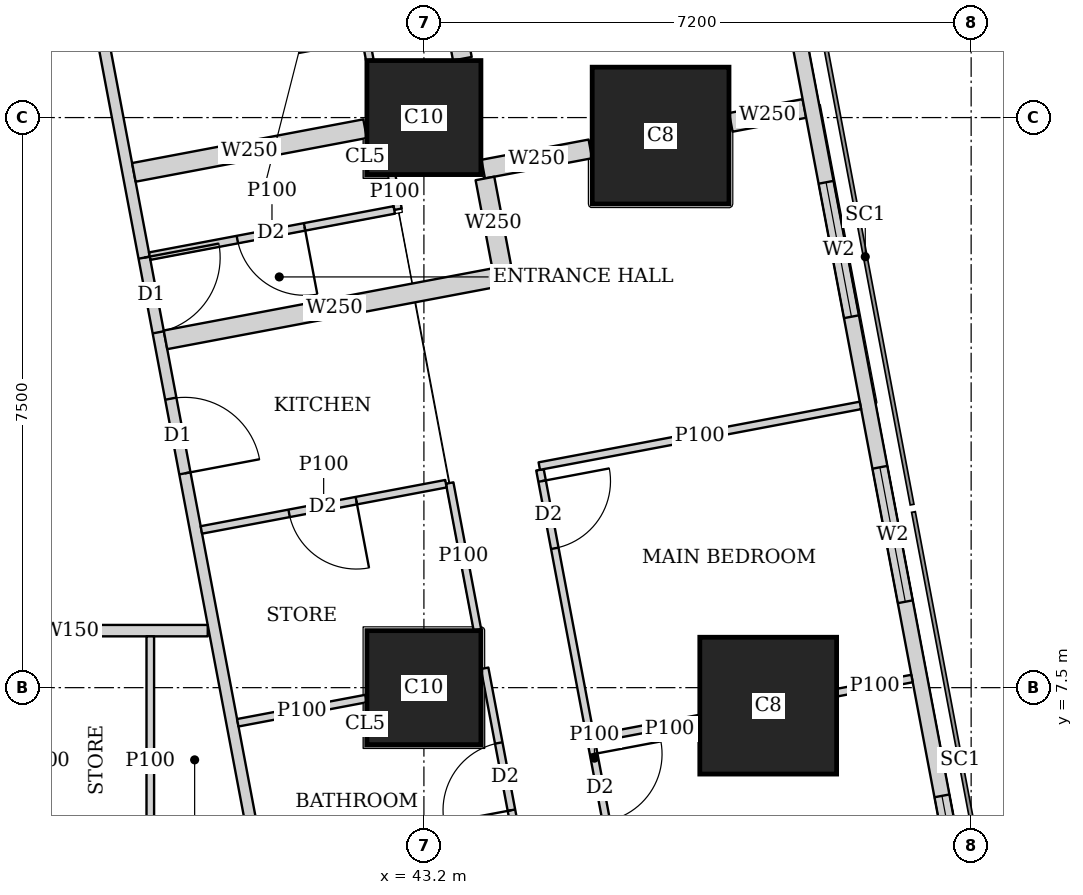
"""IFC4 building model, lengths in metres.
Left out: names, types, materials, properties, quantities, classifications, styles, units other than length and angle.
Written with IfcOpenShell. Run it as: python <this file> out.ifc"""

import sys

from ifc_helpers import new_model, si_unit, direction, frame, frame_2d, origin, origin_2d, place, context, subcontext, project, spatial, rectangle, extrude, element, fill, save


model = new_model("IFC4")
c1 = context("Model", 3, precision=1e-05, world=origin(), true_north=direction((0.0, 1.0)))
c2 = subcontext(c1, "Body", "Model", "MODEL_VIEW")
j1 = project(units=[si_unit("LENGTHUNIT", "METRE"), si_unit("PLANEANGLEUNIT", "RADIAN")], contexts=[c1])
p1 = place(None, origin())
s1 = spatial("IfcSite", under=j1, at=p1, CompositionType="ELEMENT")
p2 = place(p1, origin())
s2 = spatial("IfcBuilding", under=s1, at=p2, CompositionType="ELEMENT")
p3 = place(p2, frame((0.0, 0.0, 169.55)))
s3 = spatial("IfcBuildingStorey", under=s2, at=p3, CompositionType="ELEMENT", Elevation=169.55)
p4 = place(p3, frame((43.2, 7.5, 0.0), z_axis=(0.0, 0.0, 1.0), x_axis=(1.0, 0.0, 0.0)))
e1 = element("IfcColumn", 1, at=p4, inside=s3, PredefinedType="COLUMN", context=c2, shape_type="SweptSolid", body=[
    extrude(rectangle(XDim=1.5, YDim=1.5, at=origin_2d()), origin(), (0.0, 0.0, 1.0), 3.75),
])
p5 = place(p3, frame((47.73, 7.263, 0.0), z_axis=(0.0, 0.0, 1.0), x_axis=(1.0, 0.0, 0.0)))
e2 = element("IfcColumn", 2, at=p5, inside=s3, PredefinedType="COLUMN", context=c2, shape_type="SweptSolid", body=[
    extrude(rectangle(XDim=1.8, YDim=1.8, at=origin_2d()), origin(), (0.0, 0.0, 1.0), 3.75),
])
p6 = place(p3, frame((43.2, 15.0, 0.0), z_axis=(0.0, 0.0, 1.0), x_axis=(1.0, 0.0, 0.0)))
e3 = element("IfcColumn", 3, at=p6, inside=s3, PredefinedType="COLUMN", context=c2, shape_type="SweptSolid", body=[
    extrude(rectangle(XDim=1.5, YDim=1.5, at=origin_2d()), origin(), (0.0, 0.0, 1.0), 3.75),
])
p7 = place(p3, frame((46.314, 14.763, 0.0), z_axis=(0.0, 0.0, 1.0), x_axis=(1.0, 0.0, 0.0)))
e4 = element("IfcColumn", 4, at=p7, inside=s3, PredefinedType="COLUMN", context=c2, shape_type="SweptSolid", body=[
    extrude(rectangle(XDim=1.8, YDim=1.8, at=origin_2d()), origin(), (0.0, 0.0, 1.0), 3.75),
])
p8 = place(p3, frame((50.653, 2.703, 0.0), z_axis=(0.0, 0.0, 1.0), x_axis=(-0.185612026696, 0.982623109613, 0.0)))
e5 = element("IfcWall", 5, at=p8, inside=s3, PredefinedType="SOLIDWALL", context=c2, shape_type="SweptSolid", body=[
    extrude(rectangle(XDim=41.393, YDim=0.2, at=frame_2d((20.697, 0.0))), origin(), (0.0, 0.0, 1.0), 3.5),
])
p9 = place(p8, frame((1.633, 0.0, 0.9)))
e6 = element("IfcOpeningElement", 6, at=p9, cuts=e5, PredefinedType="OPENING", context=c2, shape_type="SweptSolid", body=[
    extrude(rectangle(XDim=1.8, YDim=1.5, at=frame_2d((0.9, 0.75))), frame((0.0, 0.11, 0.0), z_axis=(0.0, -1.0, 0.0), x_axis=(1.0, 0.0, 0.0)), (0.0, 0.0, 1.0), 0.22),
])
p10 = place(p8, frame((6.032, 0.0, 0.9)))
e7 = element("IfcOpeningElement", 7, at=p10, cuts=e5, PredefinedType="OPENING", context=c2, shape_type="SweptSolid", body=[
    extrude(rectangle(XDim=1.8, YDim=1.5, at=frame_2d((0.9, 0.75))), frame((0.0, 0.11, 0.0), z_axis=(0.0, -1.0, 0.0), x_axis=(1.0, 0.0, 0.0)), (0.0, 0.0, 1.0), 0.22),
])
p11 = place(p8, frame((9.848, 0.0, 0.9)))
e8 = element("IfcOpeningElement", 8, at=p11, cuts=e5, PredefinedType="OPENING", context=c2, shape_type="SweptSolid", body=[
    extrude(rectangle(XDim=1.8, YDim=1.5, at=frame_2d((0.9, 0.75))), frame((0.0, 0.11, 0.0), z_axis=(0.0, -1.0, 0.0), x_axis=(1.0, 0.0, 0.0)), (0.0, 0.0, 1.0), 0.22),
])
p12 = place(p8, frame((13.664, 0.0, 0.9)))
e9 = element("IfcOpeningElement", 9, at=p12, cuts=e5, PredefinedType="OPENING", context=c2, shape_type="SweptSolid", body=[
    extrude(rectangle(XDim=1.8, YDim=1.5, at=frame_2d((0.9, 0.75))), frame((0.0, 0.11, 0.0), z_axis=(0.0, -1.0, 0.0), x_axis=(1.0, 0.0, 0.0)), (0.0, 0.0, 1.0), 0.22),
])
p13 = place(p8, frame((17.481, 0.0, 0.9)))
e10 = element("IfcOpeningElement", 10, at=p13, cuts=e5, PredefinedType="OPENING", context=c2, shape_type="SweptSolid", body=[
    extrude(rectangle(XDim=1.8, YDim=1.5, at=frame_2d((0.9, 0.75))), frame((0.0, 0.11, 0.0), z_axis=(0.0, -1.0, 0.0), x_axis=(1.0, 0.0, 0.0)), (0.0, 0.0, 1.0), 0.22),
])
p14 = place(p8, frame((21.297, 0.0, 0.9)))
e11 = element("IfcOpeningElement", 11, at=p14, cuts=e5, PredefinedType="OPENING", context=c2, shape_type="SweptSolid", body=[
    extrude(rectangle(XDim=1.8, YDim=1.5, at=frame_2d((0.9, 0.75))), frame((0.0, 0.11, 0.0), z_axis=(0.0, -1.0, 0.0), x_axis=(1.0, 0.0, 0.0)), (0.0, 0.0, 1.0), 0.22),
])
p15 = place(p8, frame((25.113, 0.0, 0.9)))
e12 = element("IfcOpeningElement", 12, at=p15, cuts=e5, PredefinedType="OPENING", context=c2, shape_type="SweptSolid", body=[
    extrude(rectangle(XDim=1.8, YDim=1.5, at=frame_2d((0.9, 0.75))), frame((0.0, 0.11, 0.0), z_axis=(0.0, -1.0, 0.0), x_axis=(1.0, 0.0, 0.0)), (0.0, 0.0, 1.0), 0.22),
])
p16 = place(p8, frame((28.93, 0.0, 0.9)))
e13 = element("IfcOpeningElement", 13, at=p16, cuts=e5, PredefinedType="OPENING", context=c2, shape_type="SweptSolid", body=[
    extrude(rectangle(XDim=1.8, YDim=1.5, at=frame_2d((0.9, 0.75))), frame((0.0, 0.11, 0.0), z_axis=(0.0, -1.0, 0.0), x_axis=(1.0, 0.0, 0.0)), (0.0, 0.0, 1.0), 0.22),
])
p17 = place(p8, frame((32.746, 0.0, 0.9)))
e14 = element("IfcOpeningElement", 14, at=p17, cuts=e5, PredefinedType="OPENING", context=c2, shape_type="SweptSolid", body=[
    extrude(rectangle(XDim=1.8, YDim=1.5, at=frame_2d((0.9, 0.75))), frame((0.0, 0.11, 0.0), z_axis=(0.0, -1.0, 0.0), x_axis=(1.0, 0.0, 0.0)), (0.0, 0.0, 1.0), 0.22),
])
p18 = place(p8, frame((36.481, 0.0, 0.9)))
e15 = element("IfcOpeningElement", 15, at=p18, cuts=e5, PredefinedType="OPENING", context=c2, shape_type="SweptSolid", body=[
    extrude(rectangle(XDim=1.8, YDim=1.5, at=frame_2d((0.9, 0.75))), frame((0.0, 0.11, 0.0), z_axis=(0.0, -1.0, 0.0), x_axis=(1.0, 0.0, 0.0)), (0.0, 0.0, 1.0), 0.22),
])
p19 = place(p3, frame((40.356, 8.25, 0.0), z_axis=(0.0, 0.0, 1.0), x_axis=(-1.0, 0.0, 0.0)))
e16 = element("IfcWall", 16, at=p19, inside=s3, PredefinedType="SOLIDWALL", context=c2, shape_type="SweptSolid", body=[
    extrude(rectangle(XDim=3.605, YDim=0.15, at=frame_2d((1.802, 0.0))), origin(), (0.0, 0.0, 1.0), 3.5),
])
p20 = place(p3, frame((33.877, 43.029, 0.0), z_axis=(0.0, 0.0, 1.0), x_axis=(0.185596841028, -0.98262597798, 0.0)))
e17 = element("IfcWall", 17, at=p20, inside=s3, PredefinedType="SOLIDWALL", context=c2, shape_type="SweptSolid", body=[
    extrude(rectangle(XDim=41.66, YDim=0.15, at=frame_2d((20.83, 0.0))), origin(), (0.0, 0.0, 1.0), 2.5),
])
p21 = place(p20, frame((8.63, 0.0, 0.0)))
e18 = element("IfcOpeningElement", 18, at=p21, cuts=e17, PredefinedType="OPENING", context=c2, shape_type="SweptSolid", body=[
    extrude(rectangle(XDim=1.0, YDim=2.1, at=frame_2d((0.5, 1.05))), frame((0.0, 0.085, 0.0), z_axis=(0.0, -1.0, 0.0), x_axis=(1.0, 0.0, 0.0)), (0.0, 0.0, 1.0), 0.17),
])
p22 = place(p20, frame((13.841, 0.0, 0.0)))
e19 = element("IfcOpeningElement", 19, at=p22, cuts=e17, PredefinedType="OPENING", context=c2, shape_type="SweptSolid", body=[
    extrude(rectangle(XDim=1.0, YDim=2.1, at=frame_2d((0.5, 1.05))), frame((0.0, 0.085, 0.0), z_axis=(0.0, -1.0, 0.0), x_axis=(1.0, 0.0, 0.0)), (0.0, 0.0, 1.0), 0.17),
])
p23 = place(p20, frame((21.474, 0.0, 0.0)))
e20 = element("IfcOpeningElement", 20, at=p23, cuts=e17, PredefinedType="OPENING", context=c2, shape_type="SweptSolid", body=[
    extrude(rectangle(XDim=1.0, YDim=2.1, at=frame_2d((0.5, 1.05))), frame((0.0, 0.085, 0.0), z_axis=(0.0, -1.0, 0.0), x_axis=(1.0, 0.0, 0.0)), (0.0, 0.0, 1.0), 0.17),
])
p24 = place(p20, frame((30.4, 0.0, 0.0)))
e21 = element("IfcOpeningElement", 21, at=p24, cuts=e17, PredefinedType="OPENING", context=c2, shape_type="SweptSolid", body=[
    extrude(rectangle(XDim=1.0, YDim=2.1, at=frame_2d((0.5, 1.05))), frame((0.0, 0.085, 0.0), z_axis=(0.0, -1.0, 0.0), x_axis=(1.0, 0.0, 0.0)), (0.0, 0.0, 1.0), 0.17),
])
p25 = place(p20, frame((32.288, 0.0, 0.0)))
e22 = element("IfcOpeningElement", 22, at=p25, cuts=e17, PredefinedType="OPENING", context=c2, shape_type="SweptSolid", body=[
    extrude(rectangle(XDim=1.0, YDim=2.1, at=frame_2d((0.5, 1.05))), frame((0.0, 0.085, 0.0), z_axis=(0.0, -1.0, 0.0), x_axis=(1.0, 0.0, 0.0)), (0.0, 0.0, 1.0), 0.17),
])
p26 = place(p3, frame((39.6, 4.9, 0.0), z_axis=(0.0, 0.0, 1.0), x_axis=(0.0, 1.0, 0.0)))
e23 = element("IfcWall", 23, at=p26, inside=s3, PredefinedType="PARTITIONING", context=c2, shape_type="SweptSolid", body=[
    extrude(rectangle(XDim=3.275, YDim=0.1, at=frame_2d((1.638, 0.0))), origin(), (0.0, 0.0, 1.0), 3.5),
])
p27 = place(p3, frame((41.65, 20.193, 0.0), z_axis=(0.0, 0.0, 1.0), x_axis=(0.185692658583, -0.982607875273, 0.0)))
e24 = element("IfcWall", 24, at=p27, inside=s3, PredefinedType="PARTITIONING", context=c2, shape_type="SweptSolid", body=[
    extrude(rectangle(XDim=4.514, YDim=0.1, at=frame_2d((2.257, 0.0))), origin(), (0.0, 0.0, 1.0), 3.5),
])
p28 = place(p27, frame((0.655, 0.0, 0.0)))
e25 = element("IfcOpeningElement", 25, at=p28, cuts=e24, PredefinedType="OPENING", context=c2, shape_type="SweptSolid", body=[
    extrude(rectangle(XDim=0.9, YDim=2.1, at=frame_2d((0.45, 1.05))), frame((0.0, 0.06, 0.0), z_axis=(0.0, -1.0, 0.0), x_axis=(1.0, 0.0, 0.0)), (0.0, 0.0, 1.0), 0.12),
])
p29 = place(p27, frame((3.35, 0.0, 0.0)))
e26 = element("IfcOpeningElement", 26, at=p29, cuts=e24, PredefinedType="OPENING", context=c2, shape_type="SweptSolid", body=[
    extrude(rectangle(XDim=0.9, YDim=2.1, at=frame_2d((0.45, 1.05))), frame((0.0, 0.06, 0.0), z_axis=(0.0, -1.0, 0.0), x_axis=(1.0, 0.0, 0.0)), (0.0, 0.0, 1.0), 0.12),
])
p30 = place(p3, frame((42.775, 14.24, 0.0), z_axis=(0.0, 0.0, 1.0), x_axis=(0.185035443692, -0.982731847748, 0.0)))
e27 = element("IfcWall", 27, at=p30, inside=s3, PredefinedType="PARTITIONING", context=c2, shape_type="SweptSolid", body=[
    extrude(rectangle(XDim=0.454, YDim=0.1, at=frame_2d((0.227, 0.0))), origin(), (0.0, 0.0, 1.0), 3.5),
])
p31 = place(p3, frame((42.81, 13.785, 0.0), z_axis=(0.0, 0.0, 1.0), x_axis=(-0.982620626894, -0.185625169636, 0.0)))
e28 = element("IfcWall", 28, at=p31, inside=s3, PredefinedType="PARTITIONING", context=c2, shape_type="SweptSolid", body=[
    extrude(rectangle(XDim=3.275, YDim=0.1, at=frame_2d((1.637, 0.0))), origin(), (0.0, 0.0, 1.0), 3.5),
])
p32 = place(p31, frame((1.201, 0.0, 0.0)))
e29 = element("IfcOpeningElement", 29, at=p32, cuts=e28, PredefinedType="OPENING", context=c2, shape_type="SweptSolid", body=[
    extrude(rectangle(XDim=0.9, YDim=2.1, at=frame_2d((0.45, 1.05))), frame((0.0, 0.06, 0.0), z_axis=(0.0, -1.0, 0.0), x_axis=(1.0, 0.0, 0.0)), (0.0, 0.0, 1.0), 0.12),
])
p33 = place(p3, frame((42.426, 14.854, 0.0), z_axis=(0.0, 0.0, 1.0), x_axis=(-0.982603320446, -0.185716759201, 0.0)))
e30 = element("IfcWall", 30, at=p33, inside=s3, PredefinedType="SOLIDWALL", context=c2, shape_type="SweptSolid", body=[
    extrude(rectangle(XDim=3.096, YDim=0.25, at=frame_2d((1.548, 0.0))), origin(), (0.0, 0.0, 1.0), 3.5),
])
p34 = place(p3, frame((43.325, 17.792, 0.0), z_axis=(0.0, 0.0, 1.0), x_axis=(0.185565963553, -0.982631809566, 0.0)))
e31 = element("IfcWall", 31, at=p34, inside=s3, PredefinedType="SOLIDWALL", context=c2, shape_type="SweptSolid", body=[
    extrude(rectangle(XDim=2.054, YDim=0.25, at=frame_2d((1.027, 0.0))), origin(), (0.0, 0.0, 1.0), 3.5),
])
p35 = place(p3, frame((44.727, 10.366, 0.0), z_axis=(0.0, 0.0, 1.0), x_axis=(0.185578957652, -0.982629355595, 0.0)))
e32 = element("IfcWall", 32, at=p35, inside=s3, PredefinedType="PARTITIONING", context=c2, shape_type="SweptSolid", body=[
    extrude(rectangle(XDim=7.721, YDim=0.1, at=frame_2d((3.86, 0.0))), origin(), (0.0, 0.0, 1.0), 3.5),
])
p36 = place(p35, frame((0.151, 0.0, 0.0)))
e33 = element("IfcOpeningElement", 33, at=p36, cuts=e32, PredefinedType="OPENING", context=c2, shape_type="SweptSolid", body=[
    extrude(rectangle(XDim=0.9, YDim=2.1, at=frame_2d((0.45, 1.05))), frame((0.0, 0.06, 0.0), z_axis=(0.0, -1.0, 0.0), x_axis=(1.0, 0.0, 0.0)), (0.0, 0.0, 1.0), 0.12),
])
p37 = place(p35, frame((3.806, 0.0, 0.0)))
e34 = element("IfcOpeningElement", 34, at=p37, cuts=e32, PredefinedType="OPENING", context=c2, shape_type="SweptSolid", body=[
    extrude(rectangle(XDim=0.9, YDim=2.1, at=frame_2d((0.45, 1.05))), frame((0.0, 0.06, 0.0), z_axis=(0.0, -1.0, 0.0), x_axis=(1.0, 0.0, 0.0)), (0.0, 0.0, 1.0), 0.12),
])
p38 = place(p3, frame((43.539, 10.192, 0.0), z_axis=(0.0, 0.0, 1.0), x_axis=(0.18564540894, -0.982616803306, 0.0)))
e35 = element("IfcWall", 35, at=p38, inside=s3, PredefinedType="PARTITIONING", context=c2, shape_type="SweptSolid", body=[
    extrude(rectangle(XDim=1.966, YDim=0.1, at=frame_2d((0.983, 0.0))), origin(), (0.0, 0.0, 1.0), 3.5),
])
p39 = place(p3, frame((43.999, 7.755, 0.0), z_axis=(0.0, 0.0, 1.0), x_axis=(0.185565904578, -0.982631820703, 0.0)))
e36 = element("IfcWall", 36, at=p39, inside=s3, PredefinedType="PARTITIONING", context=c2, shape_type="SweptSolid", body=[
    extrude(rectangle(XDim=5.319, YDim=0.1, at=frame_2d((2.66, 0.0))), origin(), (0.0, 0.0, 1.0), 3.5),
])
p40 = place(p39, frame((1.0, 0.0, 0.0)))
e37 = element("IfcOpeningElement", 37, at=p40, cuts=e36, PredefinedType="OPENING", context=c2, shape_type="SweptSolid", body=[
    extrude(rectangle(XDim=0.9, YDim=2.1, at=frame_2d((0.45, 1.05))), frame((0.0, 0.06, 0.0), z_axis=(0.0, -1.0, 0.0), x_axis=(1.0, 0.0, 0.0)), (0.0, 0.0, 1.0), 0.12),
])
p41 = place(p39, frame((4.269, 0.0, 0.0)))
e38 = element("IfcOpeningElement", 38, at=p41, cuts=e36, PredefinedType="OPENING", context=c2, shape_type="SweptSolid", body=[
    extrude(rectangle(XDim=0.9, YDim=2.1, at=frame_2d((0.45, 1.05))), frame((0.0, 0.06, 0.0), z_axis=(0.0, -1.0, 0.0), x_axis=(1.0, 0.0, 0.0)), (0.0, 0.0, 1.0), 0.12),
])
p42 = place(p39, frame((2.665, 0.0, 0.0)))
e39 = element("IfcOpeningElement", 39, at=p42, cuts=e36, PredefinedType="OPENING", context=c2, shape_type="SweptSolid", body=[
    extrude(rectangle(XDim=0.9, YDim=2.1, at=frame_2d((0.45, 1.05))), frame((0.0, 0.06, 0.0), z_axis=(0.0, -1.0, 0.0), x_axis=(1.0, 0.0, 0.0)), (0.0, 0.0, 1.0), 0.12),
])
p43 = place(p3, frame((48.943, 11.213, 0.0), z_axis=(0.0, 0.0, 1.0), x_axis=(-0.982633535512, -0.185556823879, 0.0)))
e40 = element("IfcWall", 40, at=p43, inside=s3, PredefinedType="PARTITIONING", context=c2, shape_type="SweptSolid", body=[
    extrude(rectangle(XDim=4.3, YDim=0.1, at=frame_2d((2.15, 0.0))), origin(), (0.0, 0.0, 1.0), 2.1),
])
p44 = place(p3, frame((49.622, 7.62, 0.0), z_axis=(0.0, 0.0, 1.0), x_axis=(-0.982708646087, -0.185158626332, 0.0)))
e41 = element("IfcWall", 41, at=p44, inside=s3, PredefinedType="PARTITIONING", context=c2, shape_type="SweptSolid", body=[
    extrude(rectangle(XDim=1.0, YDim=0.1, at=frame_2d((0.5, 0.0))), origin(), (0.0, 0.0, 1.0), 3.5),
])
p45 = place(p3, frame((46.82, 7.091, 0.0), z_axis=(0.0, 0.0, 1.0), x_axis=(-0.982689853246, -0.185258339427, 0.0)))
e42 = element("IfcWall", 42, at=p45, inside=s3, PredefinedType="PARTITIONING", context=c2, shape_type="SweptSolid", body=[
    extrude(rectangle(XDim=1.398, YDim=0.1, at=frame_2d((0.699, 0.0))), origin(), (0.0, 0.0, 1.0), 3.5),
])
p46 = place(p3, frame((43.49, 10.183, 0.0), z_axis=(0.0, 0.0, 1.0), x_axis=(-0.982607026909, -0.185697147715, 0.0)))
e43 = element("IfcWall", 43, at=p46, inside=s3, PredefinedType="PARTITIONING", context=c2, shape_type="SweptSolid", body=[
    extrude(rectangle(XDim=3.275, YDim=0.1, at=frame_2d((1.637, 0.0))), origin(), (0.0, 0.0, 1.0), 3.5),
])
p47 = place(p46, frame((1.2, 0.0, 0.0)))
e44 = element("IfcOpeningElement", 44, at=p47, cuts=e43, PredefinedType="OPENING", context=c2, shape_type="SweptSolid", body=[
    extrude(rectangle(XDim=0.9, YDim=2.1, at=frame_2d((0.45, 1.05))), frame((0.0, 0.06, 0.0), z_axis=(0.0, -1.0, 0.0), x_axis=(1.0, 0.0, 0.0)), (0.0, 0.0, 1.0), 0.12),
])
p48 = place(p3, frame((42.44, 7.357, 0.0), z_axis=(0.0, 0.0, 1.0), x_axis=(-0.982643094077, -0.185506198448, 0.0)))
e45 = element("IfcWall", 45, at=p48, inside=s3, PredefinedType="PARTITIONING", context=c2, shape_type="SweptSolid", body=[
    extrude(rectangle(XDim=1.719, YDim=0.1, at=frame_2d((0.859, 0.0))), origin(), (0.0, 0.0, 1.0), 3.5),
])
p49 = place(p3, frame((48.206, 15.12, 0.0), z_axis=(0.0, 0.0, 1.0), x_axis=(-0.982576361834, -0.185859337043, 0.0)))
e46 = element("IfcWall", 46, at=p49, inside=s3, PredefinedType="SOLIDWALL", context=c2, shape_type="SweptSolid", body=[
    extrude(rectangle(XDim=0.985, YDim=0.25, at=frame_2d((0.493, 0.0))), origin(), (0.0, 0.0, 1.0), 2.1),
])
p50 = place(p3, frame((45.39, 14.588, 0.0), z_axis=(0.0, 0.0, 1.0), x_axis=(-0.982680951688, -0.18530555089, 0.0)))
e47 = element("IfcWall", 47, at=p50, inside=s3, PredefinedType="SOLIDWALL", context=c2, shape_type="SweptSolid", body=[
    extrude(rectangle(XDim=1.435, YDim=0.25, at=frame_2d((0.717, 0.0))), origin(), (0.0, 0.0, 1.0), 2.1),
])
p51 = place(p3, frame((44.246, 12.916, 0.0), z_axis=(0.0, 0.0, 1.0), x_axis=(-0.982612837616, -0.185666398014, 0.0)))
e48 = element("IfcWall", 48, at=p51, inside=s3, PredefinedType="SOLIDWALL", context=c2, shape_type="SweptSolid", body=[
    extrude(rectangle(XDim=4.525, YDim=0.25, at=frame_2d((2.262, 0.0))), origin(), (0.0, 0.0, 1.0), 3.5),
])
p52 = place(p3, frame((44.003, 14.199, 0.0), z_axis=(0.0, 0.0, 1.0), x_axis=(0.186323326179, -0.982488482437, 0.0)))
e49 = element("IfcWall", 49, at=p52, inside=s3, PredefinedType="SOLIDWALL", context=c2, shape_type="SweptSolid", body=[
    extrude(rectangle(XDim=1.181, YDim=0.25, at=frame_2d((0.59, 0.0))), origin(), (0.0, 0.0, 1.0), 3.5),
])
p53 = place(p9, origin())
e50 = element("IfcWindow", 50, at=p53, inside=s3, PartitioningType="SINGLE_PANEL", PredefinedType="WINDOW", context=c2, shape_type="SweptSolid", body=[
    extrude(rectangle(XDim=1.8, YDim=1.5, at=frame_2d((0.9, 0.75))), frame((0.0, 0.03, 0.0), z_axis=(0.0, -1.0, 0.0), x_axis=(1.0, 0.0, 0.0)), (0.0, 0.0, 1.0), 0.06),
])
fill(e6, e50)
p54 = place(p10, origin())
e51 = element("IfcWindow", 51, at=p54, inside=s3, PartitioningType="SINGLE_PANEL", PredefinedType="WINDOW", context=c2, shape_type="SweptSolid", body=[
    extrude(rectangle(XDim=1.8, YDim=1.5, at=frame_2d((0.9, 0.75))), frame((0.0, 0.03, 0.0), z_axis=(0.0, -1.0, 0.0), x_axis=(1.0, 0.0, 0.0)), (0.0, 0.0, 1.0), 0.06),
])
fill(e7, e51)
p55 = place(p11, origin())
e52 = element("IfcWindow", 52, at=p55, inside=s3, PartitioningType="SINGLE_PANEL", PredefinedType="WINDOW", context=c2, shape_type="SweptSolid", body=[
    extrude(rectangle(XDim=1.8, YDim=1.5, at=frame_2d((0.9, 0.75))), frame((0.0, 0.03, 0.0), z_axis=(0.0, -1.0, 0.0), x_axis=(1.0, 0.0, 0.0)), (0.0, 0.0, 1.0), 0.06),
])
fill(e8, e52)
p56 = place(p32, origin())
e53 = element("IfcDoor", 53, at=p56, inside=s3, OperationType="SINGLE_SWING_LEFT", PredefinedType="DOOR", context=c2, shape_type="SweptSolid", body=[
    extrude(rectangle(XDim=0.9, YDim=2.1, at=frame_2d((0.45, 1.05))), frame((0.0, 0.025, 0.0), z_axis=(0.0, -1.0, 0.0), x_axis=(1.0, 0.0, 0.0)), (0.0, 0.0, 1.0), 0.05),
])
fill(e29, e53)
p57 = place(p24, origin())
e54 = element("IfcDoor", 54, at=p57, inside=s3, OperationType="SINGLE_SWING_LEFT", PredefinedType="DOOR", context=c2, shape_type="SweptSolid", body=[
    extrude(rectangle(XDim=1.0, YDim=2.1, at=frame_2d((0.5, 1.05))), frame((0.0, 0.025, 0.0), z_axis=(0.0, -1.0, 0.0), x_axis=(1.0, 0.0, 0.0)), (0.0, 0.0, 1.0), 0.05),
])
fill(e21, e54)
p58 = place(p36, origin())
e55 = element("IfcDoor", 55, at=p58, inside=s3, OperationType="SINGLE_SWING_LEFT", PredefinedType="DOOR", context=c2, shape_type="SweptSolid", body=[
    extrude(rectangle(XDim=0.9, YDim=2.1, at=frame_2d((0.45, 1.05))), frame((0.0, 0.025, 0.0), z_axis=(0.0, -1.0, 0.0), x_axis=(1.0, 0.0, 0.0)), (0.0, 0.0, 1.0), 0.05),
])
fill(e33, e55)
p59 = place(p37, origin())
e56 = element("IfcDoor", 56, at=p59, inside=s3, OperationType="SINGLE_SWING_LEFT", PredefinedType="DOOR", context=c2, shape_type="SweptSolid", body=[
    extrude(rectangle(XDim=0.9, YDim=2.1, at=frame_2d((0.45, 1.05))), frame((0.0, 0.025, 0.0), z_axis=(0.0, -1.0, 0.0), x_axis=(1.0, 0.0, 0.0)), (0.0, 0.0, 1.0), 0.05),
])
fill(e34, e56)
p60 = place(p40, origin())
e57 = element("IfcDoor", 57, at=p60, inside=s3, OperationType="SINGLE_SWING_LEFT", PredefinedType="DOOR", context=c2, shape_type="SweptSolid", body=[
    extrude(rectangle(XDim=0.9, YDim=2.1, at=frame_2d((0.45, 1.05))), frame((0.0, 0.025, 0.0), z_axis=(0.0, -1.0, 0.0), x_axis=(1.0, 0.0, 0.0)), (0.0, 0.0, 1.0), 0.05),
])
fill(e37, e57)
p61 = place(p25, origin())
e58 = element("IfcDoor", 58, at=p61, inside=s3, OperationType="SINGLE_SWING_RIGHT", PredefinedType="DOOR", context=c2, shape_type="SweptSolid", body=[
    extrude(rectangle(XDim=1.0, YDim=2.1, at=frame_2d((0.5, 1.05))), frame((0.0, 0.025, 0.0), z_axis=(0.0, -1.0, 0.0), x_axis=(1.0, 0.0, 0.0)), (0.0, 0.0, 1.0), 0.05),
])
fill(e22, e58)
p62 = place(p47, origin())
e59 = element("IfcDoor", 59, at=p62, inside=s3, OperationType="SINGLE_SWING_LEFT", PredefinedType="DOOR", context=c2, shape_type="SweptSolid", body=[
    extrude(rectangle(XDim=0.9, YDim=2.1, at=frame_2d((0.45, 1.05))), frame((0.0, 0.025, 0.0), z_axis=(0.0, -1.0, 0.0), x_axis=(1.0, 0.0, 0.0)), (0.0, 0.0, 1.0), 0.05),
])
fill(e44, e59)
save(model, sys.argv[1])
